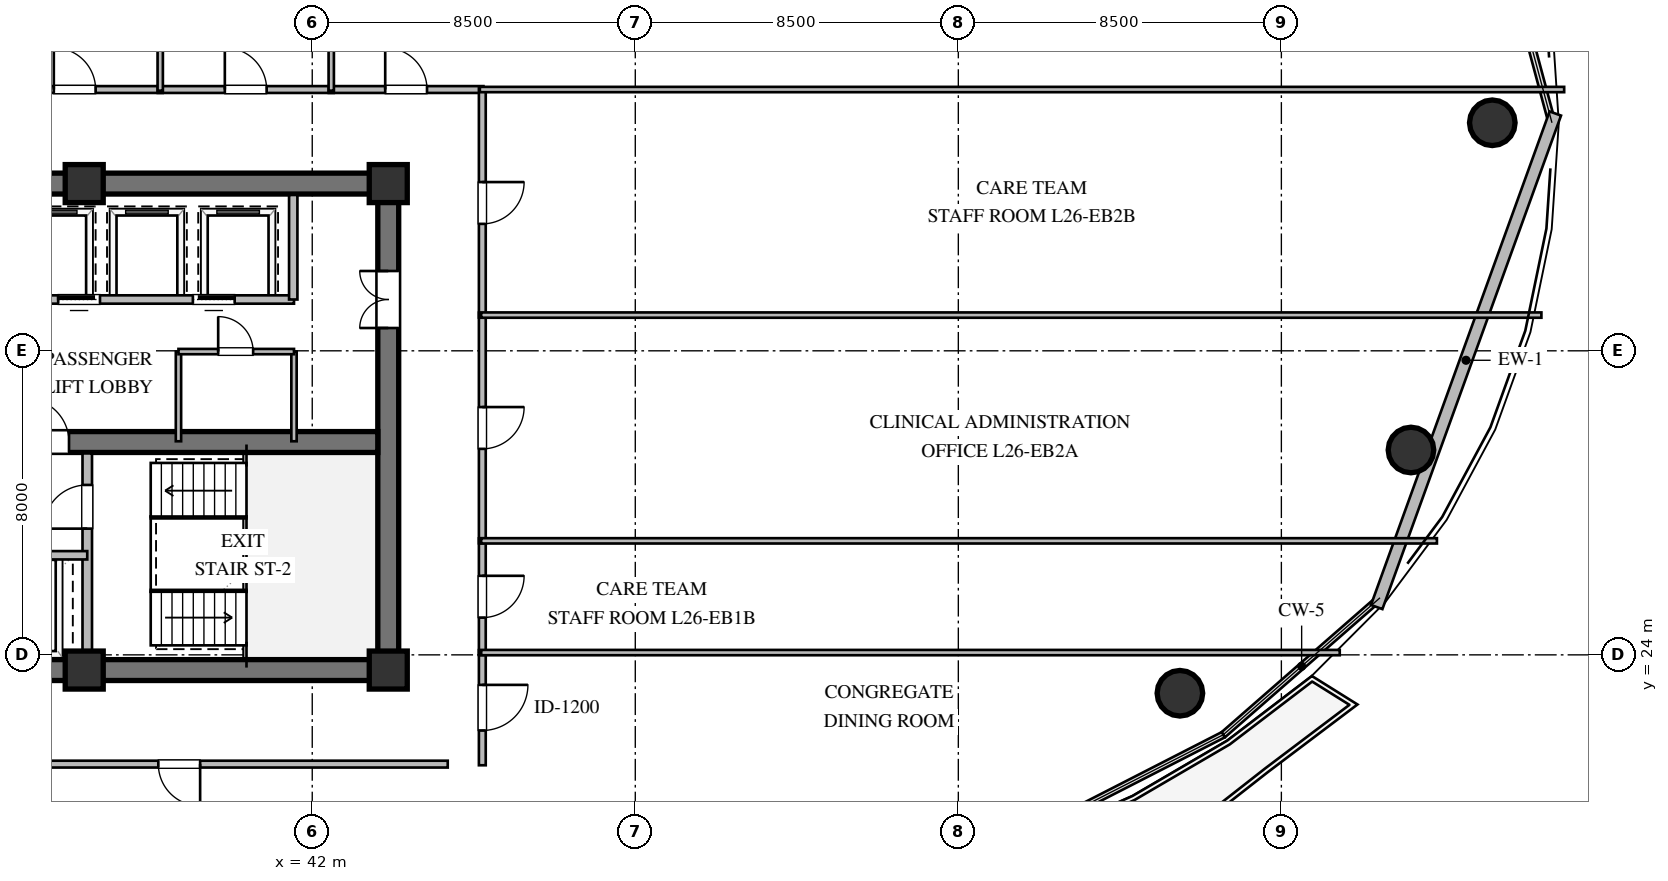
"""IFC4 building model, lengths in metres.
Left out: names, types, materials, properties, quantities, classifications, styles, units other than length and angle.
Written with IfcOpenShell. Run it as: python <this file> out.ifc"""

import sys

from ifc_helpers import new_model, si_unit, direction, frame, frame_2d, origin, origin_2d, place, context, subcontext, project, spatial, rectangle, circle, extrude, element, fill, save


model = new_model("IFC4")
c1 = context("Model", 3, precision=1e-05, world=origin(), true_north=direction((0.0, 1.0)))
c2 = subcontext(c1, "Body", "Model", "MODEL_VIEW")
j1 = project(units=[si_unit("LENGTHUNIT", "METRE"), si_unit("PLANEANGLEUNIT", "RADIAN")], contexts=[c1])
p1 = place(None, origin())
s1 = spatial("IfcSite", under=j1, at=p1, CompositionType="ELEMENT")
p2 = place(p1, origin())
s2 = spatial("IfcBuilding", under=s1, at=p2, CompositionType="ELEMENT")
p3 = place(p2, frame((0.0, 0.0, 102.6)))
s3 = spatial("IfcBuildingStorey", under=s2, at=p3, CompositionType="ELEMENT", Elevation=102.6)
for number, where, z_axis, x_axis in (
    (1, (21.725, 23.6, 0.0), (0.0, 0.0, 1.0), (1.0, 0.0, 0.0)),
    (2, (21.725, 36.4, 0.0), (0.0, 0.0, 1.0), (1.0, 0.0, 0.0)),
):
    element("IfcWall", number, at=place(p3, frame(where, z_axis=z_axis, x_axis=x_axis)), inside=s3, PredefinedType="SHEAR", context=c2, shape_type="SweptSolid", body=[
        extrude(rectangle(XDim=22.55, YDim=0.55, at=frame_2d((11.275, 0.0))), origin(), (0.0, 0.0, 1.0), 3.36),
    ])
p4 = place(p3, frame((44.0, 23.875, 0.0), z_axis=(0.0, 0.0, 1.0), x_axis=(0.0, 1.0, 0.0)))
e3 = element("IfcWall", 3, at=p4, inside=s3, PredefinedType="SHEAR", context=c2, shape_type="SweptSolid", body=[
    extrude(rectangle(XDim=12.25, YDim=0.55, at=frame_2d((6.125, 0.0))), origin(), (0.0, 0.0, 1.0), 3.36),
])
p5 = place(p4, frame((8.725, 0.0, 0.0)))
e4 = element("IfcOpeningElement", 4, at=p5, cuts=e3, PredefinedType="OPENING", context=c2, shape_type="SweptSolid", body=[
    extrude(rectangle(XDim=1.5, YDim=2.15, at=frame_2d((0.75, 1.075))), frame((0.0, 0.285, 0.0), z_axis=(0.0, -1.0, 0.0), x_axis=(1.0, 0.0, 0.0)), (0.0, 0.0, 1.0), 0.57),
])
p6 = place(p3, frame((22.275, 29.6, 0.0), z_axis=(0.0, 0.0, 1.0), x_axis=(1.0, 0.0, 0.0)))
e5 = element("IfcWall", 5, at=p6, inside=s3, PredefinedType="SHEAR", context=c2, shape_type="SweptSolid", body=[
    extrude(rectangle(XDim=21.45, YDim=0.55, at=frame_2d((10.725, 0.0))), origin(), (0.0, 0.0, 1.0), 3.36),
])
p7 = place(p6, frame((12.175, 0.0, 0.0)))
e6 = element("IfcOpeningElement", 6, at=p7, cuts=e5, PredefinedType="OPENING", context=c2, shape_type="SweptSolid", body=[
    extrude(rectangle(XDim=1.15, YDim=2.1, at=frame_2d((0.575, 1.05))), frame((0.0, 0.285, 0.0), z_axis=(0.0, -1.0, 0.0), x_axis=(1.0, 0.0, 0.0)), (0.0, 0.0, 1.0), 0.57),
])
for number, where, z_axis, x_axis in (
    (7, (36.0, 23.6, 0.0), (0.0, 0.0, 1.0), (1.0, 0.0, 0.0)),
    (8, (44.0, 23.6, 0.0), (0.0, 0.0, 1.0), (1.0, 0.0, 0.0)),
    (9, (44.0, 36.4, 0.0), (0.0, 0.0, 1.0), (1.0, 0.0, 0.0)),
    (10, (36.0, 36.4, 0.0), (0.0, 0.0, 1.0), (1.0, 0.0, 0.0)),
):
    element("IfcColumn", number, at=place(p3, frame(where, z_axis=z_axis, x_axis=x_axis)), inside=s3, PredefinedType="COLUMN", context=c2, shape_type="SweptSolid", body=[
        extrude(rectangle(XDim=1.0, YDim=1.0, at=origin_2d()), origin(), (0.0, 0.0, 1.0), 3.6),
    ])
for number, where, z_axis, x_axis in (
    (11, (73.05, 38.0, 0.0), (0.0, 0.0, 1.0), (1.0, 0.0, 0.0)),
    (12, (64.83, 22.99, 0.0), (0.0, 0.0, 1.0), (1.0, 0.0, 0.0)),
    (13, (70.91, 29.39, 0.0), (0.0, 0.0, 1.0), (1.0, 0.0, 0.0)),
):
    element("IfcColumn", number, at=place(p3, frame(where, z_axis=z_axis, x_axis=x_axis)), inside=s3, PredefinedType="COLUMN", context=c2, shape_type="SweptSolid", body=[
        extrude(circle(Radius=0.6, at=origin_2d()), origin(), (0.0, 0.0, 1.0), 3.6),
    ])
p8 = place(p3, frame((74.708, 38.244, 0.0), z_axis=(0.0, 0.0, 1.0), x_axis=(-0.340324669139, -0.94030799187, 0.0)))
e14 = element("IfcWall", 14, at=p8, inside=s3, PredefinedType="STANDARD", context=c2, shape_type="SweptSolid", body=[
    extrude(rectangle(XDim=13.81, YDim=0.32, at=frame_2d((6.905, 0.0))), origin(), (0.0, 0.0, 1.0), 3.36),
])
p9 = place(p3, frame((36.08, 23.9, 0.0), z_axis=(0.0, 0.0, 1.0), x_axis=(0.0, 1.0, 0.0)))
e15 = element("IfcWall", 15, at=p9, inside=s3, PredefinedType="SOLIDWALL", context=c2, shape_type="SweptSolid", body=[
    extrude(rectangle(XDim=5.4, YDim=0.25, at=frame_2d((2.7, 0.0))), origin(), (0.0, 0.0, 1.0), 3.36),
])
p10 = place(p9, frame((3.421, 0.0, 0.0)))
e16 = element("IfcOpeningElement", 16, at=p10, cuts=e15, PredefinedType="OPENING", context=c2, shape_type="SweptSolid", body=[
    extrude(rectangle(XDim=1.15, YDim=2.1, at=frame_2d((0.575, 1.05))), frame((0.0, 0.135, 0.0), z_axis=(0.0, -1.0, 0.0), x_axis=(1.0, 0.0, 0.0)), (0.0, 0.0, 1.0), 0.27),
])
p11 = place(p3, frame((29.92, 26.62, 0.0), z_axis=(0.0, 0.0, 1.0), x_axis=(1.0, 0.0, 0.0)))
e17 = element("IfcWall", 17, at=p11, inside=s3, PredefinedType="SOLIDWALL", context=c2, shape_type="SweptSolid", body=[
    extrude(rectangle(XDim=6.16, YDim=0.22, at=frame_2d((3.08, 0.0))), origin(), (0.0, 0.0, 1.0), 3.36),
])
p12 = place(p11, frame((0.99, 0.0, 0.0)))
e18 = element("IfcOpeningElement", 18, at=p12, cuts=e17, PredefinedType="OPENING", context=c2, shape_type="SweptSolid", body=[
    extrude(rectangle(XDim=1.1, YDim=2.1, at=frame_2d((0.55, 1.05))), frame((0.0, 0.12, 0.0), z_axis=(0.0, -1.0, 0.0), x_axis=(1.0, 0.0, 0.0)), (0.0, 0.0, 1.0), 0.24),
])
p13 = place(p11, frame((4.07, 0.0, 0.0)))
e19 = element("IfcOpeningElement", 19, at=p13, cuts=e17, PredefinedType="OPENING", context=c2, shape_type="SweptSolid", body=[
    extrude(rectangle(XDim=1.1, YDim=2.1, at=frame_2d((0.55, 1.05))), frame((0.0, 0.12, 0.0), z_axis=(0.0, -1.0, 0.0), x_axis=(1.0, 0.0, 0.0)), (0.0, 0.0, 1.0), 0.24),
])
p14 = place(p3, frame((33.98, 33.35, 0.0), z_axis=(0.0, 0.0, 1.0), x_axis=(1.0, 0.0, 0.0)))
e20 = element("IfcWall", 20, at=p14, inside=s3, PredefinedType="SOLIDWALL", context=c2, shape_type="SweptSolid", body=[
    extrude(rectangle(XDim=7.54, YDim=0.22, at=frame_2d((3.77, 0.0))), origin(), (0.0, 0.0, 1.0), 3.36),
])
p15 = place(p14, frame((1.335, 0.0, 0.0)))
e21 = element("IfcOpeningElement", 21, at=p15, cuts=e20, PredefinedType="OPENING", context=c2, shape_type="SweptSolid", body=[
    extrude(rectangle(XDim=1.1, YDim=2.1, at=frame_2d((0.55, 1.05))), frame((0.0, 0.12, 0.0), z_axis=(0.0, -1.0, 0.0), x_axis=(1.0, 0.0, 0.0)), (0.0, 0.0, 1.0), 0.24),
])
p16 = place(p14, frame((4.879, 0.0, 0.0)))
e22 = element("IfcOpeningElement", 22, at=p16, cuts=e20, PredefinedType="OPENING", context=c2, shape_type="SweptSolid", body=[
    extrude(rectangle(XDim=1.1, YDim=2.1, at=frame_2d((0.55, 1.05))), frame((0.0, 0.12, 0.0), z_axis=(0.0, -1.0, 0.0), x_axis=(1.0, 0.0, 0.0)), (0.0, 0.0, 1.0), 0.24),
])
p17 = place(p3, frame((41.5, 33.35, 0.0), z_axis=(0.0, 0.0, 1.0), x_axis=(0.0, 1.0, 0.0)))
e23 = element("IfcWall", 23, at=p17, inside=s3, PredefinedType="SOLIDWALL", context=c2, shape_type="SweptSolid", body=[
    extrude(rectangle(XDim=2.75, YDim=0.22, at=frame_2d((1.375, 0.0))), origin(), (0.0, 0.0, 1.0), 3.36),
])
for number, where, z_axis, x_axis in (
    (24, (38.48, 29.62, 0.0), (0.0, 0.0, 1.0), (0.0, 1.0, 0.0)),
    (25, (41.52, 29.62, 0.0), (0.0, 0.0, 1.0), (0.0, 1.0, 0.0)),
):
    element("IfcWall", number, at=place(p3, frame(where, z_axis=z_axis, x_axis=x_axis)), inside=s3, PredefinedType="PARTITIONING", context=c2, shape_type="SweptSolid", body=[
        extrude(rectangle(XDim=2.36, YDim=0.14, at=frame_2d((1.18, 0.0))), origin(), (0.0, 0.0, 1.0), 3.36),
    ])
p18 = place(p3, frame((38.48, 31.98, 0.0), z_axis=(0.0, 0.0, 1.0), x_axis=(1.0, 0.0, 0.0)))
e26 = element("IfcWall", 26, at=p18, inside=s3, PredefinedType="PARTITIONING", context=c2, shape_type="SweptSolid", body=[
    extrude(rectangle(XDim=3.04, YDim=0.14, at=frame_2d((1.52, 0.0))), origin(), (0.0, 0.0, 1.0), 3.36),
])
p19 = place(p18, frame((1.045, 0.0, 0.0)))
e27 = element("IfcOpeningElement", 27, at=p19, cuts=e26, PredefinedType="OPENING", context=c2, shape_type="SweptSolid", body=[
    extrude(rectangle(XDim=0.92, YDim=2.1, at=frame_2d((0.46, 1.05))), frame((0.0, 0.08, 0.0), z_axis=(0.0, -1.0, 0.0), x_axis=(1.0, 0.0, 0.0)), (0.0, 0.0, 1.0), 0.16),
])
p20 = place(p3, frame((33.435, 38.875, 0.0), z_axis=(0.0, 0.0, 1.0), x_axis=(1.0, 0.0, 0.0)))
e28 = element("IfcWall", 28, at=p20, inside=s3, PredefinedType="PARTITIONING", context=c2, shape_type="SweptSolid", body=[
    extrude(rectangle(XDim=4.63, YDim=0.18, at=frame_2d((2.315, 0.0))), origin(), (0.0, 0.0, 1.0), 3.36),
])
p21 = place(p20, frame((1.765, 0.0, 0.0)))
e29 = element("IfcOpeningElement", 29, at=p21, cuts=e28, PredefinedType="OPENING", context=c2, shape_type="SweptSolid", body=[
    extrude(rectangle(XDim=1.1, YDim=2.1, at=frame_2d((0.55, 1.05))), frame((0.0, 0.1, 0.0), z_axis=(0.0, -1.0, 0.0), x_axis=(1.0, 0.0, 0.0)), (0.0, 0.0, 1.0), 0.2),
])
p22 = place(p3, frame((37.935, 38.875, 0.0), z_axis=(0.0, 0.0, 1.0), x_axis=(1.0, 0.0, 0.0)))
e30 = element("IfcWall", 30, at=p22, inside=s3, PredefinedType="PARTITIONING", context=c2, shape_type="SweptSolid", body=[
    extrude(rectangle(XDim=4.63, YDim=0.18, at=frame_2d((2.315, 0.0))), origin(), (0.0, 0.0, 1.0), 3.36),
])
p23 = place(p22, frame((1.765, 0.0, 0.0)))
e31 = element("IfcOpeningElement", 31, at=p23, cuts=e30, PredefinedType="OPENING", context=c2, shape_type="SweptSolid", body=[
    extrude(rectangle(XDim=1.1, YDim=2.1, at=frame_2d((0.55, 1.05))), frame((0.0, 0.1, 0.0), z_axis=(0.0, -1.0, 0.0), x_axis=(1.0, 0.0, 0.0)), (0.0, 0.0, 1.0), 0.2),
])
p24 = place(p3, frame((42.435, 38.875, 0.0), z_axis=(0.0, 0.0, 1.0), x_axis=(1.0, 0.0, 0.0)))
e32 = element("IfcWall", 32, at=p24, inside=s3, PredefinedType="PARTITIONING", context=c2, shape_type="SweptSolid", body=[
    extrude(rectangle(XDim=4.07, YDim=0.18, at=frame_2d((2.035, 0.0))), origin(), (0.0, 0.0, 1.0), 3.36),
])
p25 = place(p24, frame((1.485, 0.0, 0.0)))
e33 = element("IfcOpeningElement", 33, at=p25, cuts=e32, PredefinedType="OPENING", context=c2, shape_type="SweptSolid", body=[
    extrude(rectangle(XDim=1.1, YDim=2.1, at=frame_2d((0.55, 1.05))), frame((0.0, 0.1, 0.0), z_axis=(0.0, -1.0, 0.0), x_axis=(1.0, 0.0, 0.0)), (0.0, 0.0, 1.0), 0.2),
])
p26 = place(p3, frame((46.475, 24.125, 0.0), z_axis=(0.0, 0.0, 1.0), x_axis=(0.0, -1.0, 0.0)))
e34 = element("IfcWall", 34, at=p26, inside=s3, PredefinedType="PARTITIONING", context=c2, shape_type="SweptSolid", body=[
    extrude(rectangle(XDim=3.03, YDim=0.18, at=frame_2d((1.515, 0.0))), origin(), (0.0, 0.0, 1.0), 3.36),
])
p27 = place(p26, frame((0.915, 0.0, 0.0)))
e35 = element("IfcOpeningElement", 35, at=p27, cuts=e34, PredefinedType="OPENING", context=c2, shape_type="SweptSolid", body=[
    extrude(rectangle(XDim=1.2, YDim=2.15, at=frame_2d((0.6, 1.075))), frame((0.0, 0.1, 0.0), z_axis=(0.0, -1.0, 0.0), x_axis=(1.0, 0.0, 0.0)), (0.0, 0.0, 1.0), 0.2),
])
p28 = place(p3, frame((46.475, 27.065, 0.0), z_axis=(0.0, 0.0, 1.0), x_axis=(0.0, -1.0, 0.0)))
e36 = element("IfcWall", 36, at=p28, inside=s3, PredefinedType="PARTITIONING", context=c2, shape_type="SweptSolid", body=[
    extrude(rectangle(XDim=3.07, YDim=0.18, at=frame_2d((1.535, 0.0))), origin(), (0.0, 0.0, 1.0), 3.36),
])
p29 = place(p28, frame((0.985, 0.0, 0.0)))
e37 = element("IfcOpeningElement", 37, at=p29, cuts=e36, PredefinedType="OPENING", context=c2, shape_type="SweptSolid", body=[
    extrude(rectangle(XDim=1.1, YDim=2.1, at=frame_2d((0.55, 1.05))), frame((0.0, 0.1, 0.0), z_axis=(0.0, -1.0, 0.0), x_axis=(1.0, 0.0, 0.0)), (0.0, 0.0, 1.0), 0.2),
])
p30 = place(p3, frame((46.475, 33.005, 0.0), z_axis=(0.0, 0.0, 1.0), x_axis=(0.0, -1.0, 0.0)))
e38 = element("IfcWall", 38, at=p30, inside=s3, PredefinedType="PARTITIONING", context=c2, shape_type="SweptSolid", body=[
    extrude(rectangle(XDim=6.07, YDim=0.18, at=frame_2d((3.035, 0.0))), origin(), (0.0, 0.0, 1.0), 3.36),
])
p31 = place(p30, frame((2.485, 0.0, 0.0)))
e39 = element("IfcOpeningElement", 39, at=p31, cuts=e38, PredefinedType="OPENING", context=c2, shape_type="SweptSolid", body=[
    extrude(rectangle(XDim=1.1, YDim=2.1, at=frame_2d((0.55, 1.05))), frame((0.0, 0.1, 0.0), z_axis=(0.0, -1.0, 0.0), x_axis=(1.0, 0.0, 0.0)), (0.0, 0.0, 1.0), 0.2),
])
p32 = place(p3, frame((46.475, 38.905, 0.0), z_axis=(0.0, 0.0, 1.0), x_axis=(0.0, -1.0, 0.0)))
e40 = element("IfcWall", 40, at=p32, inside=s3, PredefinedType="PARTITIONING", context=c2, shape_type="SweptSolid", body=[
    extrude(rectangle(XDim=6.03, YDim=0.18, at=frame_2d((3.015, 0.0))), origin(), (0.0, 0.0, 1.0), 3.36),
])
p33 = place(p32, frame((2.465, 0.0, 0.0)))
e41 = element("IfcOpeningElement", 41, at=p33, cuts=e40, PredefinedType="OPENING", context=c2, shape_type="SweptSolid", body=[
    extrude(rectangle(XDim=1.1, YDim=2.1, at=frame_2d((0.55, 1.05))), frame((0.0, 0.1, 0.0), z_axis=(0.0, -1.0, 0.0), x_axis=(1.0, 0.0, 0.0)), (0.0, 0.0, 1.0), 0.2),
])
p34 = place(p3, frame((45.565, 21.125, 0.0), z_axis=(0.0, 0.0, 1.0), x_axis=(-1.0, 0.0, 0.0)))
e42 = element("IfcWall", 42, at=p34, inside=s3, PredefinedType="PARTITIONING", context=c2, shape_type="SweptSolid", body=[
    extrude(rectangle(XDim=14.13, YDim=0.18, at=frame_2d((7.065, 0.0))), origin(), (0.0, 0.0, 1.0), 2.996),
])
p35 = place(p34, frame((6.515, 0.0, 0.0)))
e43 = element("IfcOpeningElement", 43, at=p35, cuts=e42, PredefinedType="OPENING", context=c2, shape_type="SweptSolid", body=[
    extrude(rectangle(XDim=1.1, YDim=2.1, at=frame_2d((0.55, 1.05))), frame((0.0, 0.1, 0.0), z_axis=(0.0, -1.0, 0.0), x_axis=(1.0, 0.0, 0.0)), (0.0, 0.0, 1.0), 0.2),
])
p36 = place(p3, frame((38.0, 63.245, 0.0), z_axis=(0.0, 0.0, 1.0), x_axis=(0.0, -1.0, 0.0)))
e44 = element("IfcWall", 44, at=p36, inside=s3, PredefinedType="PARTITIONING", context=c2, shape_type="SweptSolid", body=[
    extrude(rectangle(XDim=24.4, YDim=0.14, at=frame_2d((12.2, 0.0))), origin(), (0.0, 0.0, 1.0), 3.36),
])
p37 = place(p3, frame((42.5, 65.23, 0.0), z_axis=(0.0, 0.0, 1.0), x_axis=(0.0, -1.0, 0.0)))
e45 = element("IfcWall", 45, at=p37, inside=s3, PredefinedType="PARTITIONING", context=c2, shape_type="SweptSolid", body=[
    extrude(rectangle(XDim=26.385, YDim=0.14, at=frame_2d((13.192, 0.0))), origin(), (0.0, 0.0, 1.0), 3.36),
])
p38 = place(p3, frame((74.941, 38.875, 0.0), z_axis=(0.0, 0.0, 1.0), x_axis=(-1.0, 0.0, 0.0)))
e46 = element("IfcWall", 46, at=p38, inside=s3, PredefinedType="PARTITIONING", context=c2, shape_type="SweptSolid", body=[
    extrude(rectangle(XDim=28.531, YDim=0.14, at=frame_2d((14.266, 0.0))), origin(), (0.0, 0.0, 1.0), 3.36),
])
p39 = place(p3, frame((46.445, 24.06, 0.0), z_axis=(0.0, 0.0, 1.0), x_axis=(1.0, 0.0, 0.0)))
e47 = element("IfcWall", 47, at=p39, inside=s3, PredefinedType="PARTITIONING", context=c2, shape_type="SweptSolid", body=[
    extrude(rectangle(XDim=22.591, YDim=0.14, at=frame_2d((11.295, 0.0))), origin(), (0.0, 0.0, 1.0), 2.806),
])
p40 = place(p3, frame((46.445, 27.0, 0.0), z_axis=(0.0, 0.0, 1.0), x_axis=(1.0, 0.0, 0.0)))
e48 = element("IfcWall", 48, at=p40, inside=s3, PredefinedType="PARTITIONING", context=c2, shape_type="SweptSolid", body=[
    extrude(rectangle(XDim=25.148, YDim=0.14, at=frame_2d((12.574, 0.0))), origin(), (0.0, 0.0, 1.0), 2.806),
])
p41 = place(p3, frame((46.445, 32.94, 0.0), z_axis=(0.0, 0.0, 1.0), x_axis=(1.0, 0.0, 0.0)))
e49 = element("IfcWall", 49, at=p41, inside=s3, PredefinedType="PARTITIONING", context=c2, shape_type="SweptSolid", body=[
    extrude(rectangle(XDim=27.897, YDim=0.14, at=frame_2d((13.948, 0.0))), origin(), (0.0, 0.0, 1.0), 3.36),
])
p42 = place(p10, origin())
e50 = element("IfcDoor", 50, at=p42, inside=s3, OperationType="SINGLE_SWING_LEFT", PredefinedType="DOOR", context=c2, shape_type="SweptSolid", body=[
    extrude(rectangle(XDim=1.15, YDim=2.1, at=frame_2d((0.575, 1.05))), frame((0.0, 0.025, 0.0), z_axis=(0.0, -1.0, 0.0), x_axis=(1.0, 0.0, 0.0)), (0.0, 0.0, 1.0), 0.05),
])
fill(e16, e50)
p43 = place(p7, origin())
e51 = element("IfcDoor", 51, at=p43, inside=s3, OperationType="SINGLE_SWING_LEFT", PredefinedType="DOOR", context=c2, shape_type="SweptSolid", body=[
    extrude(rectangle(XDim=1.15, YDim=2.1, at=frame_2d((0.575, 1.05))), frame((0.0, 0.025, 0.0), z_axis=(0.0, -1.0, 0.0), x_axis=(1.0, 0.0, 0.0)), (0.0, 0.0, 1.0), 0.05),
])
fill(e6, e51)
p44 = place(p5, origin())
e52 = element("IfcDoor", 52, at=p44, inside=s3, OperationType="DOUBLE_DOOR_SINGLE_SWING", PredefinedType="DOOR", context=c2, shape_type="SweptSolid", body=[
    extrude(rectangle(XDim=1.5, YDim=2.15, at=frame_2d((0.75, 1.075))), frame((0.0, 0.025, 0.0), z_axis=(0.0, -1.0, 0.0), x_axis=(1.0, 0.0, 0.0)), (0.0, 0.0, 1.0), 0.05),
])
fill(e4, e52)
p45 = place(p15, origin())
e53 = element("IfcDoor", 53, at=p45, inside=s3, OperationType="SLIDING_TO_LEFT", PredefinedType="DOOR", context=c2, shape_type="SweptSolid", body=[
    extrude(rectangle(XDim=1.1, YDim=2.1, at=frame_2d((0.55, 1.05))), frame((0.0, 0.025, 0.0), z_axis=(0.0, -1.0, 0.0), x_axis=(1.0, 0.0, 0.0)), (0.0, 0.0, 1.0), 0.05),
])
fill(e21, e53)
p46 = place(p16, origin())
e54 = element("IfcDoor", 54, at=p46, inside=s3, OperationType="SLIDING_TO_RIGHT", PredefinedType="DOOR", context=c2, shape_type="SweptSolid", body=[
    extrude(rectangle(XDim=1.1, YDim=2.1, at=frame_2d((0.55, 1.05))), frame((0.0, 0.025, 0.0), z_axis=(0.0, -1.0, 0.0), x_axis=(1.0, 0.0, 0.0)), (0.0, 0.0, 1.0), 0.05),
])
fill(e22, e54)
p47 = place(p19, origin())
e55 = element("IfcDoor", 55, at=p47, inside=s3, OperationType="SINGLE_SWING_LEFT", PredefinedType="DOOR", context=c2, shape_type="SweptSolid", body=[
    extrude(rectangle(XDim=0.92, YDim=2.1, at=frame_2d((0.46, 1.05))), frame((0.0, 0.025, 0.0), z_axis=(0.0, -1.0, 0.0), x_axis=(1.0, 0.0, 0.0)), (0.0, 0.0, 1.0), 0.05),
])
fill(e27, e55)
p48 = place(p21, origin())
e56 = element("IfcDoor", 56, at=p48, inside=s3, OperationType="SINGLE_SWING_LEFT", PredefinedType="DOOR", context=c2, shape_type="SweptSolid", body=[
    extrude(rectangle(XDim=1.1, YDim=2.1, at=frame_2d((0.55, 1.05))), frame((0.0, 0.025, 0.0), z_axis=(0.0, -1.0, 0.0), x_axis=(1.0, 0.0, 0.0)), (0.0, 0.0, 1.0), 0.05),
])
fill(e29, e56)
p49 = place(p23, origin())
e57 = element("IfcDoor", 57, at=p49, inside=s3, OperationType="SINGLE_SWING_LEFT", PredefinedType="DOOR", context=c2, shape_type="SweptSolid", body=[
    extrude(rectangle(XDim=1.1, YDim=2.1, at=frame_2d((0.55, 1.05))), frame((0.0, 0.025, 0.0), z_axis=(0.0, -1.0, 0.0), x_axis=(1.0, 0.0, 0.0)), (0.0, 0.0, 1.0), 0.05),
])
fill(e31, e57)
p50 = place(p25, origin())
e58 = element("IfcDoor", 58, at=p50, inside=s3, OperationType="SINGLE_SWING_LEFT", PredefinedType="DOOR", context=c2, shape_type="SweptSolid", body=[
    extrude(rectangle(XDim=1.1, YDim=2.1, at=frame_2d((0.55, 1.05))), frame((0.0, 0.025, 0.0), z_axis=(0.0, -1.0, 0.0), x_axis=(1.0, 0.0, 0.0)), (0.0, 0.0, 1.0), 0.05),
])
fill(e33, e58)
p51 = place(p27, origin())
e59 = element("IfcDoor", 59, at=p51, inside=s3, OperationType="SINGLE_SWING_LEFT", PredefinedType="DOOR", context=c2, shape_type="SweptSolid", body=[
    extrude(rectangle(XDim=1.2, YDim=2.15, at=frame_2d((0.6, 1.075))), frame((0.0, 0.025, 0.0), z_axis=(0.0, -1.0, 0.0), x_axis=(1.0, 0.0, 0.0)), (0.0, 0.0, 1.0), 0.05),
])
fill(e35, e59)
p52 = place(p29, origin())
e60 = element("IfcDoor", 60, at=p52, inside=s3, OperationType="SINGLE_SWING_LEFT", PredefinedType="DOOR", context=c2, shape_type="SweptSolid", body=[
    extrude(rectangle(XDim=1.1, YDim=2.1, at=frame_2d((0.55, 1.05))), frame((0.0, 0.025, 0.0), z_axis=(0.0, -1.0, 0.0), x_axis=(1.0, 0.0, 0.0)), (0.0, 0.0, 1.0), 0.05),
])
fill(e37, e60)
p53 = place(p31, origin())
e61 = element("IfcDoor", 61, at=p53, inside=s3, OperationType="SINGLE_SWING_LEFT", PredefinedType="DOOR", context=c2, shape_type="SweptSolid", body=[
    extrude(rectangle(XDim=1.1, YDim=2.1, at=frame_2d((0.55, 1.05))), frame((0.0, 0.025, 0.0), z_axis=(0.0, -1.0, 0.0), x_axis=(1.0, 0.0, 0.0)), (0.0, 0.0, 1.0), 0.05),
])
fill(e39, e61)
p54 = place(p33, origin())
e62 = element("IfcDoor", 62, at=p54, inside=s3, OperationType="SINGLE_SWING_LEFT", PredefinedType="DOOR", context=c2, shape_type="SweptSolid", body=[
    extrude(rectangle(XDim=1.1, YDim=2.1, at=frame_2d((0.55, 1.05))), frame((0.0, 0.025, 0.0), z_axis=(0.0, -1.0, 0.0), x_axis=(1.0, 0.0, 0.0)), (0.0, 0.0, 1.0), 0.05),
])
fill(e41, e62)
p55 = place(p35, origin())
e63 = element("IfcDoor", 63, at=p55, inside=s3, OperationType="SINGLE_SWING_LEFT", PredefinedType="DOOR", context=c2, shape_type="SweptSolid", body=[
    extrude(rectangle(XDim=1.1, YDim=2.1, at=frame_2d((0.55, 1.05))), frame((0.0, 0.025, 0.0), z_axis=(0.0, -1.0, 0.0), x_axis=(1.0, 0.0, 0.0)), (0.0, 0.0, 1.0), 0.05),
])
fill(e43, e63)
save(model, sys.argv[1])
